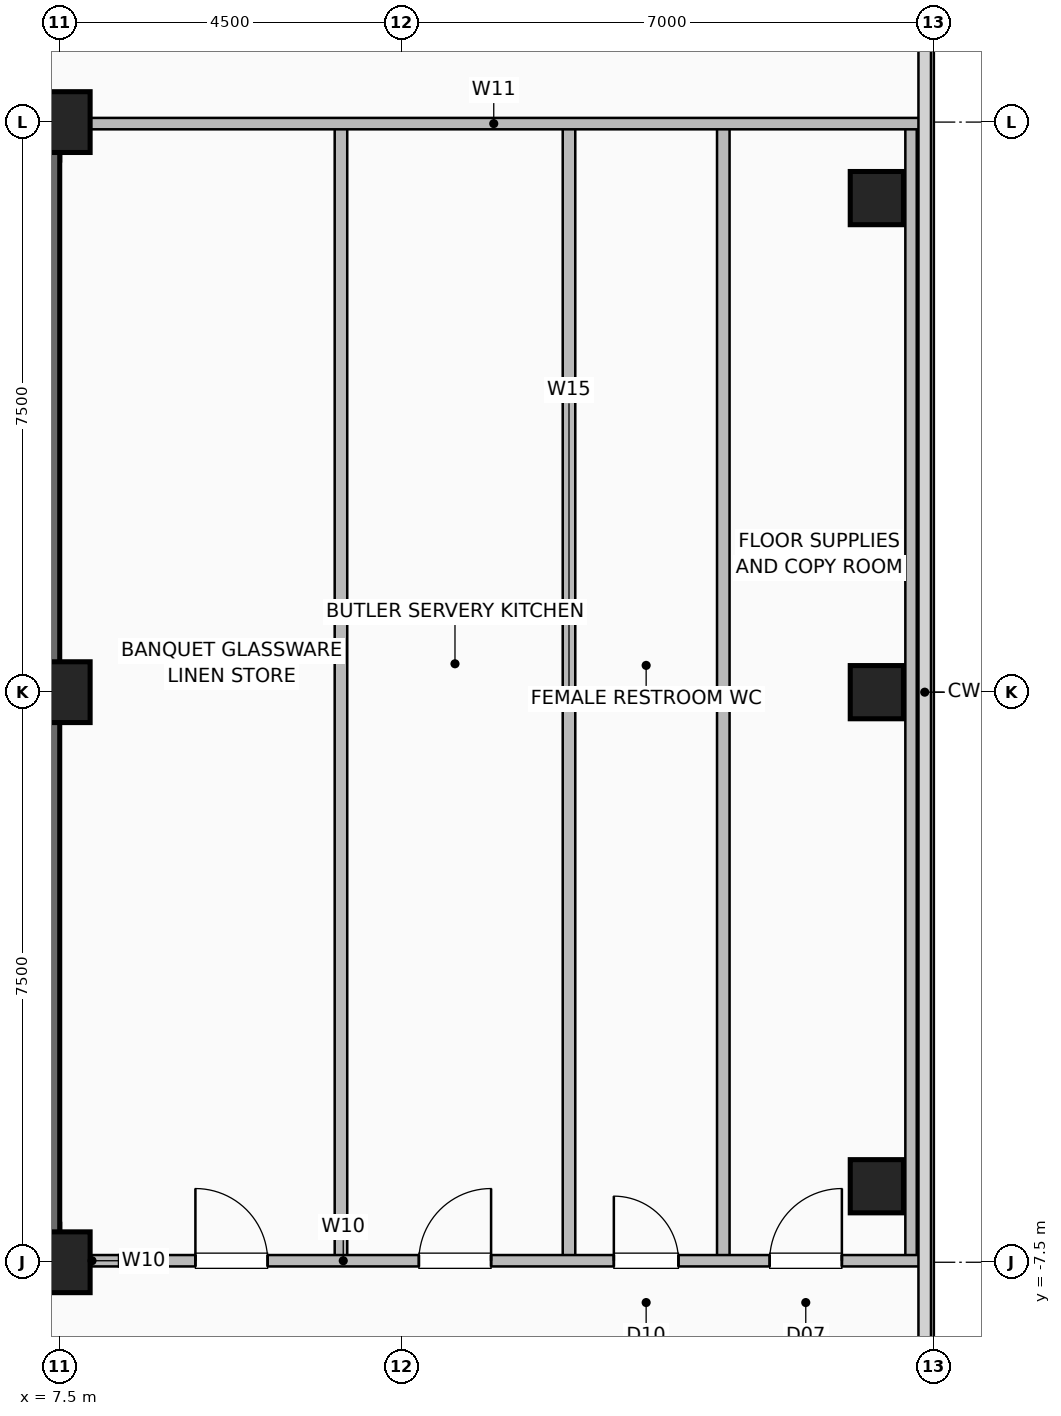
"""IFC4 building model, lengths in metres.
Left out: names, types, materials, properties, quantities, classifications, styles, units other than length and angle.
Written with IfcOpenShell. Run it as: python <this file> out.ifc"""

import sys

from ifc_helpers import new_model, si_unit, direction, frame, frame_2d, origin, origin_2d, place, context, subcontext, project, spatial, rectangle, hollow_rectangle, extrude, element, fill, save


model = new_model("IFC4")
c1 = context("Model", 3, precision=1e-05, world=origin(), true_north=direction((0.0, 1.0)))
c2 = subcontext(c1, "Body", "Model", "MODEL_VIEW")
j1 = project(units=[si_unit("LENGTHUNIT", "METRE"), si_unit("PLANEANGLEUNIT", "RADIAN")], contexts=[c1])
p1 = place(None, origin())
s1 = spatial("IfcSite", under=j1, at=p1, CompositionType="ELEMENT")
p2 = place(p1, origin())
s2 = spatial("IfcBuilding", under=s1, at=p2, CompositionType="ELEMENT")
p3 = place(p2, frame((0.0, 0.0, 297.2)))
s3 = spatial("IfcBuildingStorey", under=s2, at=p3, CompositionType="ELEMENT", Elevation=297.2)
for number, where, z_axis, x_axis in (
    (1, (7.5, -7.5, 0.0), (0.0, 0.0, 1.0), (1.0, 0.0, 0.0)),
    (2, (7.5, 0.0, 0.0), (0.0, 0.0, 1.0), (1.0, 0.0, 0.0)),
    (3, (7.5, 7.5, 0.0), (0.0, 0.0, 1.0), (1.0, 0.0, 0.0)),
):
    element("IfcColumn", number, at=place(p3, frame(where, z_axis=z_axis, x_axis=x_axis)), inside=s3, PredefinedType="COLUMN", context=c2, shape_type="SweptSolid", body=[
        extrude(hollow_rectangle(XDim=0.8, YDim=0.8, WallThickness=0.04, at=origin_2d()), origin(), (0.0, 0.0, 1.0), 3.6),
    ])
for number, where, z_axis, x_axis in (
    (4, (18.25, -6.5, 0.0), (0.0, 0.0, 1.0), (1.0, 0.0, 0.0)),
    (5, (18.25, 0.0, 0.0), (0.0, 0.0, 1.0), (1.0, 0.0, 0.0)),
    (6, (18.25, 6.5, 0.0), (0.0, 0.0, 1.0), (1.0, 0.0, 0.0)),
):
    element("IfcColumn", number, at=place(p3, frame(where, z_axis=z_axis, x_axis=x_axis)), inside=s3, PredefinedType="COLUMN", context=c2, shape_type="SweptSolid", body=[
        extrude(hollow_rectangle(XDim=0.7, YDim=0.7, WallThickness=0.035, at=origin_2d()), origin(), (0.0, 0.0, 1.0), 3.2),
    ])
p4 = place(p3, frame((-7.5, -7.25, 0.0), z_axis=(0.0, 0.0, 1.0), x_axis=(1.0, 0.0, 0.0)))
e7 = element("IfcWall", 7, at=p4, inside=s3, PredefinedType="SHEAR", context=c2, shape_type="SweptSolid", body=[
    extrude(rectangle(XDim=15.0, YDim=0.5, at=frame_2d((7.5, 0.0))), origin(), (0.0, 0.0, 1.0), 3.2),
])
p5 = place(p4, frame((1.55, 0.0, 0.0)))
e8 = element("IfcOpeningElement", 8, at=p5, cuts=e7, PredefinedType="OPENING", context=c2, shape_type="SweptSolid", body=[
    extrude(rectangle(XDim=1.05, YDim=2.08, at=frame_2d((0.525, 1.04))), frame((0.0, 0.26, 0.0), z_axis=(0.0, -1.0, 0.0), x_axis=(1.0, 0.0, 0.0)), (0.0, 0.0, 1.0), 0.52),
])
p6 = place(p4, frame((12.4, 0.0, 0.0)))
e9 = element("IfcOpeningElement", 9, at=p6, cuts=e7, PredefinedType="OPENING", context=c2, shape_type="SweptSolid", body=[
    extrude(rectangle(XDim=1.05, YDim=2.08, at=frame_2d((0.525, 1.04))), frame((0.0, 0.26, 0.0), z_axis=(0.0, -1.0, 0.0), x_axis=(1.0, 0.0, 0.0)), (0.0, 0.0, 1.0), 0.52),
])
p7 = place(p4, frame((5.2, 0.0, 0.0)))
e10 = element("IfcOpeningElement", 10, at=p7, cuts=e7, PredefinedType="OPENING", context=c2, shape_type="SweptSolid", body=[
    extrude(rectangle(XDim=1.0, YDim=2.08, at=frame_2d((0.5, 1.04))), frame((0.0, 0.26, 0.0), z_axis=(0.0, -1.0, 0.0), x_axis=(1.0, 0.0, 0.0)), (0.0, 0.0, 1.0), 0.52),
])
p8 = place(p4, frame((8.65, 0.0, 0.0)))
e11 = element("IfcOpeningElement", 11, at=p8, cuts=e7, PredefinedType="OPENING", context=c2, shape_type="SweptSolid", body=[
    extrude(rectangle(XDim=1.0, YDim=2.08, at=frame_2d((0.5, 1.04))), frame((0.0, 0.26, 0.0), z_axis=(0.0, -1.0, 0.0), x_axis=(1.0, 0.0, 0.0)), (0.0, 0.0, 1.0), 0.52),
])
for number, where, z_axis, x_axis in (
    (12, (-7.5, 7.25, 0.0), (0.0, 0.0, 1.0), (1.0, 0.0, 0.0)),
    (13, (7.25, -7.5, 0.0), (0.0, 0.0, 1.0), (0.0, 1.0, 0.0)),
):
    element("IfcWall", number, at=place(p3, frame(where, z_axis=z_axis, x_axis=x_axis)), inside=s3, PredefinedType="SHEAR", context=c2, shape_type="SweptSolid", body=[
        extrude(rectangle(XDim=15.0, YDim=0.5, at=frame_2d((7.5, 0.0))), origin(), (0.0, 0.0, 1.0), 3.2),
    ])
p9 = place(p3, frame((7.45, -7.48, 0.0), z_axis=(0.0, 0.0, 1.0), x_axis=(1.0, 0.0, 0.0)))
e14 = element("IfcWall", 14, at=p9, inside=s3, PredefinedType="PARTITIONING", context=c2, shape_type="SweptSolid", body=[
    extrude(rectangle(XDim=0.95, YDim=0.15, at=frame_2d((0.475, 0.0))), origin(), (0.0, 0.0, 1.0), 2.075),
])
for number, where, z_axis, x_axis in (
    (15, (16.23, -7.48, 0.0), (0.0, 0.0, 1.0), (0.0, 1.0, 0.0)),
    (16, (11.2, -7.48, 0.0), (0.0, 0.0, 1.0), (0.0, 1.0, 0.0)),
    (17, (14.2, -7.48, 0.0), (0.0, 0.0, 1.0), (0.0, 1.0, 0.0)),
):
    element("IfcWall", number, at=place(p3, frame(where, z_axis=z_axis, x_axis=x_axis)), inside=s3, PredefinedType="PLUMBINGWALL", context=c2, shape_type="SweptSolid", body=[
        extrude(rectangle(XDim=14.9, YDim=0.165, at=frame_2d((7.45, 0.0))), origin(), (0.0, 0.0, 1.0), 3.2),
    ])
p10 = place(p3, frame((18.7, -7.48, 0.0), z_axis=(0.0, 0.0, 1.0), x_axis=(0.0, 1.0, 0.0)))
e18 = element("IfcWall", 18, at=p10, inside=s3, PredefinedType="PARTITIONING", context=c2, shape_type="SweptSolid", body=[
    extrude(rectangle(XDim=14.9, YDim=0.15, at=frame_2d((7.45, 0.0))), origin(), (0.0, 0.0, 1.0), 3.2),
])
p11 = place(p3, frame((8.28, -7.48, 0.0), z_axis=(0.0, 0.0, 1.0), x_axis=(1.0, 0.0, 0.0)))
e19 = element("IfcWall", 19, at=p11, inside=s3, PredefinedType="PARTITIONING", context=c2, shape_type="SweptSolid", body=[
    extrude(rectangle(XDim=10.54, YDim=0.15, at=frame_2d((5.27, 0.0))), origin(), (0.0, 0.0, 1.0), 2.075),
])
p12 = place(p11, frame((1.005, 0.0, 0.0)))
e20 = element("IfcOpeningElement", 20, at=p12, cuts=e19, PredefinedType="OPENING", context=c2, shape_type="SweptSolid", body=[
    extrude(rectangle(XDim=0.95, YDim=2.06, at=frame_2d((0.475, 1.03))), frame((0.0, 0.085, 0.0), z_axis=(0.0, -1.0, 0.0), x_axis=(1.0, 0.0, 0.0)), (0.0, 0.0, 1.0), 0.17),
])
p13 = place(p11, frame((3.945, 0.0, 0.0)))
e21 = element("IfcOpeningElement", 21, at=p13, cuts=e19, PredefinedType="OPENING", context=c2, shape_type="SweptSolid", body=[
    extrude(rectangle(XDim=0.95, YDim=2.06, at=frame_2d((0.475, 1.03))), frame((0.0, 0.085, 0.0), z_axis=(0.0, -1.0, 0.0), x_axis=(1.0, 0.0, 0.0)), (0.0, 0.0, 1.0), 0.17),
])
p14 = place(p11, frame((6.51, 0.0, 0.0)))
e22 = element("IfcOpeningElement", 22, at=p14, cuts=e19, PredefinedType="OPENING", context=c2, shape_type="SweptSolid", body=[
    extrude(rectangle(XDim=0.85, YDim=2.05, at=frame_2d((0.425, 1.025))), frame((0.0, 0.085, 0.0), z_axis=(0.0, -1.0, 0.0), x_axis=(1.0, 0.0, 0.0)), (0.0, 0.0, 1.0), 0.17),
])
p15 = place(p11, frame((8.56, 0.0, 0.0)))
e23 = element("IfcOpeningElement", 23, at=p15, cuts=e19, PredefinedType="OPENING", context=c2, shape_type="SweptSolid", body=[
    extrude(rectangle(XDim=0.95, YDim=2.06, at=frame_2d((0.475, 1.03))), frame((0.0, 0.085, 0.0), z_axis=(0.0, -1.0, 0.0), x_axis=(1.0, 0.0, 0.0)), (0.0, 0.0, 1.0), 0.17),
])
p16 = place(p3, frame((7.6, 7.48, 0.0), z_axis=(0.0, 0.0, 1.0), x_axis=(1.0, 0.0, 0.0)))
e24 = element("IfcWall", 24, at=p16, inside=s3, PredefinedType="PARTITIONING", context=c2, shape_type="SweptSolid", body=[
    extrude(rectangle(XDim=11.22, YDim=0.15, at=frame_2d((5.61, 0.0))), origin(), (0.0, 0.0, 1.0), 2.075),
])
p17 = place(p12, origin())
e25 = element("IfcDoor", 25, at=p17, inside=s3, OperationType="SINGLE_SWING_LEFT", PredefinedType="DOOR", context=c2, shape_type="SweptSolid", body=[
    extrude(rectangle(XDim=0.95, YDim=2.06, at=frame_2d((0.475, 1.03))), frame((0.0, 0.025, 0.0), z_axis=(0.0, -1.0, 0.0), x_axis=(1.0, 0.0, 0.0)), (0.0, 0.0, 1.0), 0.05),
])
fill(e20, e25)
p18 = place(p13, origin())
e26 = element("IfcDoor", 26, at=p18, inside=s3, OperationType="SINGLE_SWING_RIGHT", PredefinedType="DOOR", context=c2, shape_type="SweptSolid", body=[
    extrude(rectangle(XDim=0.95, YDim=2.06, at=frame_2d((0.475, 1.03))), frame((0.0, 0.025, 0.0), z_axis=(0.0, -1.0, 0.0), x_axis=(1.0, 0.0, 0.0)), (0.0, 0.0, 1.0), 0.05),
])
fill(e21, e26)
p19 = place(p14, origin())
e27 = element("IfcDoor", 27, at=p19, inside=s3, OperationType="SINGLE_SWING_LEFT", PredefinedType="DOOR", context=c2, shape_type="SweptSolid", body=[
    extrude(rectangle(XDim=0.85, YDim=2.05, at=frame_2d((0.425, 1.025))), frame((0.0, 0.025, 0.0), z_axis=(0.0, -1.0, 0.0), x_axis=(1.0, 0.0, 0.0)), (0.0, 0.0, 1.0), 0.05),
])
fill(e22, e27)
p20 = place(p15, origin())
e28 = element("IfcDoor", 28, at=p20, inside=s3, OperationType="SINGLE_SWING_RIGHT", PredefinedType="DOOR", context=c2, shape_type="SweptSolid", body=[
    extrude(rectangle(XDim=0.95, YDim=2.06, at=frame_2d((0.475, 1.03))), frame((0.0, 0.025, 0.0), z_axis=(0.0, -1.0, 0.0), x_axis=(1.0, 0.0, 0.0)), (0.0, 0.0, 1.0), 0.05),
])
fill(e23, e28)
save(model, sys.argv[1])
